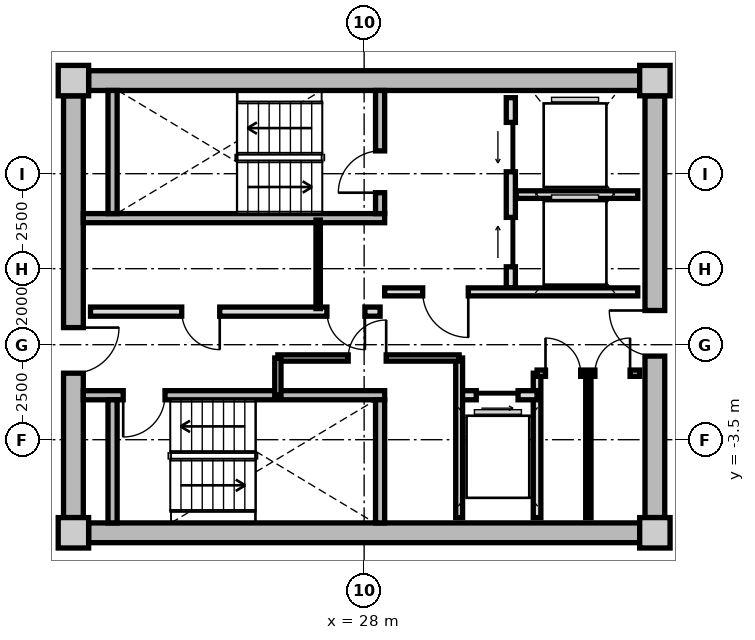
"""IFC4 building model, lengths in metres.
Left out: names, types, materials, properties, quantities, classifications, styles, units other than length and angle.
Written with IfcOpenShell. Run it as: python <this file> out.ifc"""

import sys

from ifc_helpers import new_model, si_unit, direction, frame, frame_2d, origin, origin_2d, place, context, subcontext, project, spatial, rectangle, extrude, source, transform, mapped, element, fill, save


model = new_model("IFC4")
c1 = context("Model", 3, precision=1e-05, world=origin(), true_north=direction((0.0, 1.0)))
c2 = subcontext(c1, "Body", "Model", "MODEL_VIEW")
j1 = project(units=[si_unit("LENGTHUNIT", "METRE"), si_unit("PLANEANGLEUNIT", "RADIAN")], contexts=[c1])
p1 = place(None, origin())
s1 = spatial("IfcSite", under=j1, at=p1, CompositionType="ELEMENT")
p2 = place(p1, origin())
s2 = spatial("IfcBuilding", under=s1, at=p2, CompositionType="ELEMENT")
p3 = place(p2, frame((0.0, 0.0, 220.0)))
s3 = spatial("IfcBuildingStorey", under=s2, at=p3, CompositionType="ELEMENT", Elevation=220.0)
m1 = source(origin(), c2, "Body", "SweptSolid", [
    extrude(rectangle(XDim=0.8, YDim=0.8, at=origin_2d()), origin(), (0.0, 0.0, 1.0), 3.05),
])
for number, where, z_axis, x_axis in (
    (1, (20.35, -5.95, 0.0), (0.0, 0.0, 1.0), (1.0, 0.0, 0.0)),
    (2, (35.65, -5.95, 0.0), (0.0, 0.0, 1.0), (1.0, 0.0, 0.0)),
    (3, (35.65, 5.95, 0.0), (0.0, 0.0, 1.0), (1.0, 0.0, 0.0)),
    (4, (20.35, 5.95, 0.0), (0.0, 0.0, 1.0), (1.0, 0.0, 0.0)),
):
    element("IfcColumn", number, at=place(p3, frame(where, z_axis=z_axis, x_axis=x_axis)), inside=s3, PredefinedType="COLUMN", context=c2, shape_type="MappedRepresentation", body=[
        mapped(m1, transform((0.0, 0.0, 0.0), x_axis=(1.0, 0.0, 0.0), y_axis=(0.0, 1.0, 0.0), z_axis=(0.0, 0.0, 1.0), scale=1.0)),
    ])
m2 = source(origin(), c2, "Body", "SweptSolid", [
    extrude(rectangle(XDim=14.5, YDim=0.52, at=frame_2d((7.25, 0.0))), origin(), (0.0, 0.0, 1.0), 2.76),
])
for number, where, z_axis, x_axis in (
    (5, (20.75, 5.95, 0.0), (0.0, 0.0, 1.0), (1.0, 0.0, 0.0)),
    (6, (35.25, -5.95, 0.0), (0.0, 0.0, 1.0), (-1.0, 0.0, 0.0)),
):
    element("IfcWall", number, at=place(p3, frame(where, z_axis=z_axis, x_axis=x_axis)), inside=s3, PredefinedType="SHEAR", context=c2, shape_type="MappedRepresentation", body=[
        mapped(m2, transform((0.0, 0.0, 0.0), x_axis=(1.0, 0.0, 0.0), y_axis=(0.0, 1.0, 0.0), z_axis=(0.0, 0.0, 1.0), scale=1.0)),
    ])
m3 = source(origin(), c2, "Body", "SweptSolid", [
    extrude(rectangle(XDim=11.1, YDim=0.52, at=frame_2d((5.55, 0.0))), origin(), (0.0, 0.0, 1.0), 2.76),
])
p4 = place(p3, frame((20.35, -5.55, 0.0), z_axis=(0.0, 0.0, 1.0), x_axis=(0.0, 1.0, 0.0)))
e7 = element("IfcWall", 7, at=p4, inside=s3, PredefinedType="SHEAR", context=c2, shape_type="MappedRepresentation", body=[
    mapped(m3, transform((0.0, 0.0, 0.0), x_axis=(1.0, 0.0, 0.0), y_axis=(0.0, 1.0, 0.0), z_axis=(0.0, 0.0, 1.0), scale=1.0)),
])
p5 = place(p4, frame((3.8, 0.0, 0.0)))
e8 = element("IfcOpeningElement", 8, at=p5, cuts=e7, PredefinedType="OPENING", context=c2, shape_type="SweptSolid", body=[
    extrude(rectangle(XDim=1.2, YDim=2.15, at=frame_2d((0.6, 1.075))), frame((0.0, 0.27, 0.0), z_axis=(0.0, -1.0, 0.0), x_axis=(1.0, 0.0, 0.0)), (0.0, 0.0, 1.0), 0.54),
])
p6 = place(p3, frame((35.65, 5.55, 0.0), z_axis=(0.0, 0.0, 1.0), x_axis=(0.0, -1.0, 0.0)))
e9 = element("IfcWall", 9, at=p6, inside=s3, PredefinedType="SHEAR", context=c2, shape_type="MappedRepresentation", body=[
    mapped(m3, transform((0.0, 0.0, 0.0), x_axis=(1.0, 0.0, 0.0), y_axis=(0.0, 1.0, 0.0), z_axis=(0.0, 0.0, 1.0), scale=1.0)),
])
p7 = place(p6, frame((5.65, 0.0, 0.0)))
e10 = element("IfcOpeningElement", 10, at=p7, cuts=e9, PredefinedType="OPENING", context=c2, shape_type="SweptSolid", body=[
    extrude(rectangle(XDim=1.2, YDim=2.15, at=frame_2d((0.6, 1.075))), frame((0.0, 0.27, 0.0), z_axis=(0.0, -1.0, 0.0), x_axis=(1.0, 0.0, 0.0)), (0.0, 0.0, 1.0), 0.54),
])
m4 = source(origin(), c2, "Body", "SweptSolid", [
    extrude(rectangle(XDim=7.93, YDim=0.24, at=frame_2d((3.965, 0.0))), origin(), (0.0, 0.0, 1.0), 2.76),
])
p8 = place(p3, frame((20.61, 2.33, 0.0), z_axis=(0.0, 0.0, 1.0), x_axis=(1.0, 0.0, 0.0)))
e11 = element("IfcWall", 11, at=p8, inside=s3, PredefinedType="PARTITIONING", context=c2, shape_type="MappedRepresentation", body=[
    mapped(m4, transform((0.0, 0.0, 0.0), x_axis=(1.0, 0.0, 0.0), y_axis=(0.0, 1.0, 0.0), z_axis=(0.0, 0.0, 1.0), scale=1.0)),
])
m5 = source(origin(), c2, "Body", "SweptSolid", [
    extrude(rectangle(XDim=3.24, YDim=0.24, at=frame_2d((1.62, 0.0))), origin(), (0.0, 0.0, 1.0), 2.76),
])
p9 = place(p3, frame((21.38, 2.45, 0.0), z_axis=(0.0, 0.0, 1.0), x_axis=(0.0, 1.0, 0.0)))
e12 = element("IfcWall", 12, at=p9, inside=s3, PredefinedType="PARTITIONING", context=c2, shape_type="MappedRepresentation", body=[
    mapped(m5, transform((0.0, 0.0, 0.0), x_axis=(1.0, 0.0, 0.0), y_axis=(0.0, 1.0, 0.0), z_axis=(0.0, 0.0, 1.0), scale=1.0)),
])
p10 = place(p3, frame((28.42, 2.45, 0.0), z_axis=(0.0, 0.0, 1.0), x_axis=(0.0, 1.0, 0.0)))
e13 = element("IfcWall", 13, at=p10, inside=s3, PredefinedType="PARTITIONING", context=c2, shape_type="MappedRepresentation", body=[
    mapped(m5, transform((0.0, 0.0, 0.0), x_axis=(1.0, 0.0, 0.0), y_axis=(0.0, 1.0, 0.0), z_axis=(0.0, 0.0, 1.0), scale=1.0)),
])
p11 = place(p10, frame((0.55, 0.0, 0.0)))
e14 = element("IfcOpeningElement", 14, at=p11, cuts=e13, PredefinedType="OPENING", context=c2, shape_type="SweptSolid", body=[
    extrude(rectangle(XDim=1.1, YDim=2.15, at=frame_2d((0.55, 1.075))), frame((0.0, 0.13, 0.0), z_axis=(0.0, -1.0, 0.0), x_axis=(1.0, 0.0, 0.0)), (0.0, 0.0, 1.0), 0.26),
])
p12 = place(p3, frame((20.61, -2.33, 0.0), z_axis=(0.0, 0.0, 1.0), x_axis=(1.0, 0.0, 0.0)))
e15 = element("IfcWall", 15, at=p12, inside=s3, PredefinedType="PARTITIONING", context=c2, shape_type="MappedRepresentation", body=[
    mapped(m4, transform((0.0, 0.0, 0.0), x_axis=(1.0, 0.0, 0.0), y_axis=(0.0, 1.0, 0.0), z_axis=(0.0, 0.0, 1.0), scale=1.0)),
])
p13 = place(p12, frame((1.05, 0.0, 0.0)))
e16 = element("IfcOpeningElement", 16, at=p13, cuts=e15, PredefinedType="OPENING", context=c2, shape_type="SweptSolid", body=[
    extrude(rectangle(XDim=1.1, YDim=2.15, at=frame_2d((0.55, 1.075))), frame((0.0, 0.13, 0.0), z_axis=(0.0, -1.0, 0.0), x_axis=(1.0, 0.0, 0.0)), (0.0, 0.0, 1.0), 0.26),
])
for number, where, z_axis, x_axis in (
    (17, (21.38, -5.69, 0.0), (0.0, 0.0, 1.0), (0.0, 1.0, 0.0)),
    (18, (28.42, -5.69, 0.0), (0.0, 0.0, 1.0), (0.0, 1.0, 0.0)),
):
    element("IfcWall", number, at=place(p3, frame(where, z_axis=z_axis, x_axis=x_axis)), inside=s3, PredefinedType="PARTITIONING", context=c2, shape_type="MappedRepresentation", body=[
        mapped(m5, transform((0.0, 0.0, 0.0), x_axis=(1.0, 0.0, 0.0), y_axis=(0.0, 1.0, 0.0), z_axis=(0.0, 0.0, 1.0), scale=1.0)),
    ])
m6 = source(origin(), c2, "Body", "SweptSolid", [
    extrude(rectangle(XDim=5.0, YDim=0.24, at=frame_2d((2.5, 0.0))), origin(), (0.0, 0.0, 1.0), 2.745),
])
p14 = place(p3, frame((31.86, 0.5, 0.0), z_axis=(0.0, 0.0, 1.0), x_axis=(0.0, 1.0, 0.0)))
e19 = element("IfcWall", 19, at=p14, inside=s3, PredefinedType="PARTITIONING", context=c2, shape_type="MappedRepresentation", body=[
    mapped(m6, transform((0.0, 0.0, 0.0), x_axis=(1.0, 0.0, 0.0), y_axis=(0.0, 1.0, 0.0), z_axis=(0.0, 0.0, 1.0), scale=1.0)),
])
p15 = place(p14, frame((3.05, 0.0, 0.0)))
e20 = element("IfcOpeningElement", 20, at=p15, cuts=e19, PredefinedType="OPENING", context=c2, shape_type="SweptSolid", body=[
    extrude(rectangle(XDim=1.3, YDim=2.2, at=frame_2d((0.65, 1.1))), frame((0.0, 0.13, 0.0), z_axis=(0.0, -1.0, 0.0), x_axis=(1.0, 0.0, 0.0)), (0.0, 0.0, 1.0), 0.26),
])
p16 = place(p14, frame((0.55, 0.0, 0.0)))
e21 = element("IfcOpeningElement", 21, at=p16, cuts=e19, PredefinedType="OPENING", context=c2, shape_type="SweptSolid", body=[
    extrude(rectangle(XDim=1.3, YDim=2.2, at=frame_2d((0.65, 1.1))), frame((0.0, 0.13, 0.0), z_axis=(0.0, -1.0, 0.0), x_axis=(1.0, 0.0, 0.0)), (0.0, 0.0, 1.0), 0.26),
])
m7 = source(origin(), c2, "Body", "SweptSolid", [
    extrude(rectangle(XDim=3.2, YDim=0.2, at=frame_2d((1.6, 0.0))), origin(), (0.0, 0.0, 1.0), 2.745),
])
p17 = place(p3, frame((32.0, 2.95, 0.0), z_axis=(0.0, 0.0, 1.0), x_axis=(1.0, 0.0, 0.0)))
e22 = element("IfcWall", 22, at=p17, inside=s3, PredefinedType="PARTITIONING", context=c2, shape_type="MappedRepresentation", body=[
    mapped(m7, transform((0.0, 0.0, 0.0), x_axis=(1.0, 0.0, 0.0), y_axis=(0.0, 1.0, 0.0), z_axis=(0.0, 0.0, 1.0), scale=1.0)),
])
m8 = source(origin(), c2, "Body", "SweptSolid", [
    extrude(rectangle(XDim=6.66, YDim=0.21, at=frame_2d((3.33, 0.0))), origin(), (0.0, 0.0, 1.0), 2.745),
])
p18 = place(p3, frame((28.54, 0.39, 0.0), z_axis=(0.0, 0.0, 1.0), x_axis=(1.0, 0.0, 0.0)))
e23 = element("IfcWall", 23, at=p18, inside=s3, PredefinedType="PARTITIONING", context=c2, shape_type="MappedRepresentation", body=[
    mapped(m8, transform((0.0, 0.0, 0.0), x_axis=(1.0, 0.0, 0.0), y_axis=(0.0, 1.0, 0.0), z_axis=(0.0, 0.0, 1.0), scale=1.0)),
])
p19 = place(p18, frame((1.0, 0.0, 0.0)))
e24 = element("IfcOpeningElement", 24, at=p19, cuts=e23, PredefinedType="OPENING", context=c2, shape_type="SweptSolid", body=[
    extrude(rectangle(XDim=1.2, YDim=2.15, at=frame_2d((0.6, 1.075))), frame((0.0, 0.115, 0.0), z_axis=(0.0, -1.0, 0.0), x_axis=(1.0, 0.0, 0.0)), (0.0, 0.0, 1.0), 0.23),
])
m9 = source(origin(), c2, "Body", "SweptSolid", [
    extrude(rectangle(XDim=7.62, YDim=0.24, at=frame_2d((3.81, 0.0))), origin(), (0.0, 0.0, 1.0), 2.745),
])
p20 = place(p3, frame((20.8, -0.13, 0.0), z_axis=(0.0, 0.0, 1.0), x_axis=(1.0, 0.0, 0.0)))
e25 = element("IfcWall", 25, at=p20, inside=s3, PredefinedType="PARTITIONING", context=c2, shape_type="MappedRepresentation", body=[
    mapped(m9, transform((0.0, 0.0, 0.0), x_axis=(1.0, 0.0, 0.0), y_axis=(0.0, 1.0, 0.0), z_axis=(0.0, 0.0, 1.0), scale=1.0)),
])
p21 = place(p20, frame((6.22, 0.0, 0.0)))
e26 = element("IfcOpeningElement", 26, at=p21, cuts=e25, PredefinedType="OPENING", context=c2, shape_type="SweptSolid", body=[
    extrude(rectangle(XDim=1.0, YDim=2.1, at=frame_2d((0.5, 1.05))), frame((0.0, 0.13, 0.0), z_axis=(0.0, -1.0, 0.0), x_axis=(1.0, 0.0, 0.0)), (0.0, 0.0, 1.0), 0.26),
])
p22 = place(p20, frame((2.4, 0.0, 0.0)))
e27 = element("IfcOpeningElement", 27, at=p22, cuts=e25, PredefinedType="OPENING", context=c2, shape_type="SweptSolid", body=[
    extrude(rectangle(XDim=1.0, YDim=2.1, at=frame_2d((0.5, 1.05))), frame((0.0, 0.13, 0.0), z_axis=(0.0, -1.0, 0.0), x_axis=(1.0, 0.0, 0.0)), (0.0, 0.0, 1.0), 0.26),
])
m10 = source(origin(), c2, "Body", "SweptSolid", [
    extrude(rectangle(XDim=2.33, YDim=0.115, at=frame_2d((1.165, 0.0))), origin(), (0.0, 0.0, 1.0), 2.745),
])
p23 = place(p3, frame((26.79, -0.05, 0.0), z_axis=(0.0, 0.0, 1.0), x_axis=(0.0, 1.0, 0.0)))
e28 = element("IfcWall", 28, at=p23, inside=s3, PredefinedType="PARTITIONING", context=c2, shape_type="MappedRepresentation", body=[
    mapped(m10, transform((0.0, 0.0, 0.0), x_axis=(1.0, 0.0, 0.0), y_axis=(0.0, 1.0, 0.0), z_axis=(0.0, 0.0, 1.0), scale=1.0)),
])
m11 = source(origin(), c2, "Body", "SweptSolid", [
    extrude(rectangle(XDim=3.8, YDim=0.2, at=frame_2d((1.9, 0.0))), origin(), (0.0, 0.0, 1.0), 2.745),
])
p24 = place(p3, frame((32.55, -5.55, 0.0), z_axis=(0.0, 0.0, 1.0), x_axis=(0.0, 1.0, 0.0)))
e29 = element("IfcWall", 29, at=p24, inside=s3, PredefinedType="PARTITIONING", context=c2, shape_type="MappedRepresentation", body=[
    mapped(m11, transform((0.0, 0.0, 0.0), x_axis=(1.0, 0.0, 0.0), y_axis=(0.0, 1.0, 0.0), z_axis=(0.0, 0.0, 1.0), scale=1.0)),
])
m12 = source(origin(), c2, "Body", "SweptSolid", [
    extrude(rectangle(XDim=2.05, YDim=0.24, at=frame_2d((1.025, 0.0))), origin(), (0.0, 0.0, 1.0), 2.745),
])
p25 = place(p3, frame((30.5, -2.33, 0.0), z_axis=(0.0, 0.0, 1.0), x_axis=(1.0, 0.0, 0.0)))
e30 = element("IfcWall", 30, at=p25, inside=s3, PredefinedType="PARTITIONING", context=c2, shape_type="MappedRepresentation", body=[
    mapped(m12, transform((0.0, 0.0, 0.0), x_axis=(1.0, 0.0, 0.0), y_axis=(0.0, 1.0, 0.0), z_axis=(0.0, 0.0, 1.0), scale=1.0)),
])
p26 = place(p25, frame((0.45, 0.0, 0.0)))
e31 = element("IfcOpeningElement", 31, at=p26, cuts=e30, PredefinedType="OPENING", context=c2, shape_type="SweptSolid", body=[
    extrude(rectangle(XDim=1.1, YDim=2.2, at=frame_2d((0.55, 1.1))), frame((0.0, 0.13, 0.0), z_axis=(0.0, -1.0, 0.0), x_axis=(1.0, 0.0, 0.0)), (0.0, 0.0, 1.0), 0.26),
])
m13 = source(origin(), c2, "Body", "SweptSolid", [
    extrude(rectangle(XDim=4.2, YDim=0.18, at=frame_2d((2.1, 0.0))), origin(), (0.0, 0.0, 1.0), 2.745),
])
p27 = place(p3, frame((30.5, -5.55, 0.0), z_axis=(0.0, 0.0, 1.0), x_axis=(0.0, 1.0, 0.0)))
e32 = element("IfcWall", 32, at=p27, inside=s3, PredefinedType="PARTITIONING", context=c2, shape_type="MappedRepresentation", body=[
    mapped(m13, transform((0.0, 0.0, 0.0), x_axis=(1.0, 0.0, 0.0), y_axis=(0.0, 1.0, 0.0), z_axis=(0.0, 0.0, 1.0), scale=1.0)),
])
m14 = source(origin(), c2, "Body", "SweptSolid", [
    extrude(rectangle(XDim=4.77, YDim=0.165, at=frame_2d((2.385, 0.0))), origin(), (0.0, 0.0, 1.0), 2.745),
])
p28 = place(p3, frame((25.73, -1.35, 0.0), z_axis=(0.0, 0.0, 1.0), x_axis=(1.0, 0.0, 0.0)))
e33 = element("IfcWall", 33, at=p28, inside=s3, PredefinedType="PARTITIONING", context=c2, shape_type="MappedRepresentation", body=[
    mapped(m14, transform((0.0, 0.0, 0.0), x_axis=(1.0, 0.0, 0.0), y_axis=(0.0, 1.0, 0.0), z_axis=(0.0, 0.0, 1.0), scale=1.0)),
])
p29 = place(p28, frame((1.85, 0.0, 0.0)))
e34 = element("IfcOpeningElement", 34, at=p29, cuts=e33, PredefinedType="OPENING", context=c2, shape_type="SweptSolid", body=[
    extrude(rectangle(XDim=1.0, YDim=2.1, at=frame_2d((0.5, 1.05))), frame((0.0, 0.093, 0.0), z_axis=(0.0, -1.0, 0.0), x_axis=(1.0, 0.0, 0.0)), (0.0, 0.0, 1.0), 0.185),
])
m15 = source(origin(), c2, "Body", "SweptSolid", [
    extrude(rectangle(XDim=0.98, YDim=0.165, at=frame_2d((0.49, 0.0))), origin(), (0.0, 0.0, 1.0), 2.745),
])
p30 = place(p3, frame((25.73, -2.33, 0.0), z_axis=(0.0, 0.0, 1.0), x_axis=(0.0, 1.0, 0.0)))
e35 = element("IfcWall", 35, at=p30, inside=s3, PredefinedType="PARTITIONING", context=c2, shape_type="MappedRepresentation", body=[
    mapped(m15, transform((0.0, 0.0, 0.0), x_axis=(1.0, 0.0, 0.0), y_axis=(0.0, 1.0, 0.0), z_axis=(0.0, 0.0, 1.0), scale=1.0)),
])
m16 = source(origin(), c2, "Body", "SweptSolid", [
    extrude(rectangle(XDim=2.7, YDim=0.165, at=frame_2d((1.35, 0.0))), origin(), (0.0, 0.0, 1.0), 2.745),
])
p31 = place(p3, frame((32.55, -1.75, 0.0), z_axis=(0.0, 0.0, 1.0), x_axis=(1.0, 0.0, 0.0)))
e36 = element("IfcWall", 36, at=p31, inside=s3, PredefinedType="PARTITIONING", context=c2, shape_type="MappedRepresentation", body=[
    mapped(m16, transform((0.0, 0.0, 0.0), x_axis=(1.0, 0.0, 0.0), y_axis=(0.0, 1.0, 0.0), z_axis=(0.0, 0.0, 1.0), scale=1.0)),
])
p32 = place(p31, frame((0.222, 0.0, 0.0)))
e37 = element("IfcOpeningElement", 37, at=p32, cuts=e36, PredefinedType="OPENING", context=c2, shape_type="SweptSolid", body=[
    extrude(rectangle(XDim=0.925, YDim=2.1, at=frame_2d((0.462, 1.05))), frame((0.0, 0.093, 0.0), z_axis=(0.0, -1.0, 0.0), x_axis=(1.0, 0.0, 0.0)), (0.0, 0.0, 1.0), 0.185),
])
p33 = place(p31, frame((1.522, 0.0, 0.0)))
e38 = element("IfcOpeningElement", 38, at=p33, cuts=e36, PredefinedType="OPENING", context=c2, shape_type="SweptSolid", body=[
    extrude(rectangle(XDim=0.925, YDim=2.1, at=frame_2d((0.462, 1.05))), frame((0.0, 0.093, 0.0), z_axis=(0.0, -1.0, 0.0), x_axis=(1.0, 0.0, 0.0)), (0.0, 0.0, 1.0), 0.185),
])
m17 = source(origin(), c2, "Body", "SweptSolid", [
    extrude(rectangle(XDim=3.8, YDim=0.14, at=frame_2d((1.9, 0.0))), origin(), (0.0, 0.0, 1.0), 2.745),
])
p34 = place(p3, frame((33.9, -5.55, 0.0), z_axis=(0.0, 0.0, 1.0), x_axis=(0.0, 1.0, 0.0)))
e39 = element("IfcWall", 39, at=p34, inside=s3, PredefinedType="PARTITIONING", context=c2, shape_type="MappedRepresentation", body=[
    mapped(m17, transform((0.0, 0.0, 0.0), x_axis=(1.0, 0.0, 0.0), y_axis=(0.0, 1.0, 0.0), z_axis=(0.0, 0.0, 1.0), scale=1.0)),
])
m18 = source(origin(), c2, "Body", "SweptSolid", [
    extrude(rectangle(XDim=1.1, YDim=2.15, at=frame_2d((0.55, 1.075))), frame((0.0, 0.025, 0.0), z_axis=(0.0, -1.0, 0.0), x_axis=(1.0, 0.0, 0.0)), (0.0, 0.0, 1.0), 0.05),
])
p35 = place(p11, origin())
e40 = element("IfcDoor", 40, at=p35, inside=s3, OperationType="SINGLE_SWING_LEFT", PredefinedType="DOOR", context=c2, shape_type="MappedRepresentation", body=[
    mapped(m18, transform((0.0, 0.0, 0.0), x_axis=(1.0, 0.0, 0.0), y_axis=(0.0, 1.0, 0.0), z_axis=(0.0, 0.0, 1.0), scale=1.0)),
])
fill(e14, e40)
p36 = place(p13, frame((1.1, 0.0, 0.0), z_axis=(0.0, 0.0, 1.0), x_axis=(-1.0, 0.0, 0.0)))
e41 = element("IfcDoor", 41, at=p36, inside=s3, OperationType="SINGLE_SWING_RIGHT", PredefinedType="DOOR", context=c2, shape_type="MappedRepresentation", body=[
    mapped(m18, transform((0.0, 0.0, 0.0), x_axis=(1.0, 0.0, 0.0), y_axis=(0.0, 1.0, 0.0), z_axis=(0.0, 0.0, 1.0), scale=1.0)),
])
fill(e16, e41)
m19 = source(origin(), c2, "Body", "SweptSolid", [
    extrude(rectangle(XDim=1.3, YDim=2.2, at=frame_2d((0.65, 1.1))), frame((0.0, 0.025, 0.0), z_axis=(0.0, -1.0, 0.0), x_axis=(1.0, 0.0, 0.0)), (0.0, 0.0, 1.0), 0.05),
])
p37 = place(p15, origin())
e42 = element("IfcDoor", 42, at=p37, inside=s3, OperationType="SLIDING_TO_LEFT", PredefinedType="DOOR", context=c2, shape_type="MappedRepresentation", body=[
    mapped(m19, transform((0.0, 0.0, 0.0), x_axis=(1.0, 0.0, 0.0), y_axis=(0.0, 1.0, 0.0), z_axis=(0.0, 0.0, 1.0), scale=1.0)),
])
fill(e20, e42)
p38 = place(p16, origin())
e43 = element("IfcDoor", 43, at=p38, inside=s3, OperationType="SLIDING_TO_RIGHT", PredefinedType="DOOR", context=c2, shape_type="MappedRepresentation", body=[
    mapped(m19, transform((0.0, 0.0, 0.0), x_axis=(1.0, 0.0, 0.0), y_axis=(0.0, 1.0, 0.0), z_axis=(0.0, 0.0, 1.0), scale=1.0)),
])
fill(e21, e43)
m20 = source(origin(), c2, "Body", "SweptSolid", [
    extrude(rectangle(XDim=1.2, YDim=2.15, at=frame_2d((0.6, 1.075))), frame((0.0, 0.025, 0.0), z_axis=(0.0, -1.0, 0.0), x_axis=(1.0, 0.0, 0.0)), (0.0, 0.0, 1.0), 0.05),
])
p39 = place(p19, frame((1.2, 0.0, 0.0), z_axis=(0.0, 0.0, 1.0), x_axis=(-1.0, 0.0, 0.0)))
e44 = element("IfcDoor", 44, at=p39, inside=s3, OperationType="SINGLE_SWING_LEFT", PredefinedType="DOOR", context=c2, shape_type="MappedRepresentation", body=[
    mapped(m20, transform((0.0, 0.0, 0.0), x_axis=(1.0, 0.0, 0.0), y_axis=(0.0, 1.0, 0.0), z_axis=(0.0, 0.0, 1.0), scale=1.0)),
])
fill(e24, e44)
p40 = place(p5, frame((1.2, 0.0, 0.0), z_axis=(0.0, 0.0, 1.0), x_axis=(-1.0, 0.0, 0.0)))
e45 = element("IfcDoor", 45, at=p40, inside=s3, OperationType="SINGLE_SWING_LEFT", PredefinedType="DOOR", context=c2, shape_type="MappedRepresentation", body=[
    mapped(m20, transform((0.0, 0.0, 0.0), x_axis=(1.0, 0.0, 0.0), y_axis=(0.0, 1.0, 0.0), z_axis=(0.0, 0.0, 1.0), scale=1.0)),
])
fill(e8, e45)
p41 = place(p7, frame((1.2, 0.0, 0.0), z_axis=(0.0, 0.0, 1.0), x_axis=(-1.0, 0.0, 0.0)))
e46 = element("IfcDoor", 46, at=p41, inside=s3, OperationType="SINGLE_SWING_RIGHT", PredefinedType="DOOR", context=c2, shape_type="MappedRepresentation", body=[
    mapped(m20, transform((0.0, 0.0, 0.0), x_axis=(1.0, 0.0, 0.0), y_axis=(0.0, 1.0, 0.0), z_axis=(0.0, 0.0, 1.0), scale=1.0)),
])
fill(e10, e46)
m21 = source(origin(), c2, "Body", "SweptSolid", [
    extrude(rectangle(XDim=1.0, YDim=2.1, at=frame_2d((0.5, 1.05))), frame((0.0, 0.025, 0.0), z_axis=(0.0, -1.0, 0.0), x_axis=(1.0, 0.0, 0.0)), (0.0, 0.0, 1.0), 0.05),
])
p42 = place(p21, frame((1.0, 0.0, 0.0), z_axis=(0.0, 0.0, 1.0), x_axis=(-1.0, 0.0, 0.0)))
e47 = element("IfcDoor", 47, at=p42, inside=s3, OperationType="SINGLE_SWING_LEFT", PredefinedType="DOOR", context=c2, shape_type="MappedRepresentation", body=[
    mapped(m21, transform((0.0, 0.0, 0.0), x_axis=(1.0, 0.0, 0.0), y_axis=(0.0, 1.0, 0.0), z_axis=(0.0, 0.0, 1.0), scale=1.0)),
])
fill(e26, e47)
p43 = place(p22, frame((1.0, 0.0, 0.0), z_axis=(0.0, 0.0, 1.0), x_axis=(-1.0, 0.0, 0.0)))
e48 = element("IfcDoor", 48, at=p43, inside=s3, OperationType="SINGLE_SWING_LEFT", PredefinedType="DOOR", context=c2, shape_type="MappedRepresentation", body=[
    mapped(m21, transform((0.0, 0.0, 0.0), x_axis=(1.0, 0.0, 0.0), y_axis=(0.0, 1.0, 0.0), z_axis=(0.0, 0.0, 1.0), scale=1.0)),
])
fill(e27, e48)
m22 = source(origin(), c2, "Body", "SweptSolid", [
    extrude(rectangle(XDim=1.1, YDim=2.2, at=frame_2d((0.55, 1.1))), frame((0.0, 0.025, 0.0), z_axis=(0.0, -1.0, 0.0), x_axis=(1.0, 0.0, 0.0)), (0.0, 0.0, 1.0), 0.05),
])
p44 = place(p26, frame((1.1, 0.0, 0.0), z_axis=(0.0, 0.0, 1.0), x_axis=(-1.0, 0.0, 0.0)))
e49 = element("IfcDoor", 49, at=p44, inside=s3, OperationType="SLIDING_TO_RIGHT", PredefinedType="DOOR", context=c2, shape_type="MappedRepresentation", body=[
    mapped(m22, transform((0.0, 0.0, 0.0), x_axis=(1.0, 0.0, 0.0), y_axis=(0.0, 1.0, 0.0), z_axis=(0.0, 0.0, 1.0), scale=1.0)),
])
fill(e31, e49)
p45 = place(p29, origin())
e50 = element("IfcDoor", 50, at=p45, inside=s3, OperationType="SINGLE_SWING_RIGHT", PredefinedType="DOOR", context=c2, shape_type="MappedRepresentation", body=[
    mapped(m21, transform((0.0, 0.0, 0.0), x_axis=(1.0, 0.0, 0.0), y_axis=(0.0, 1.0, 0.0), z_axis=(0.0, 0.0, 1.0), scale=1.0)),
])
fill(e34, e50)
m23 = source(origin(), c2, "Body", "SweptSolid", [
    extrude(rectangle(XDim=0.925, YDim=2.1, at=frame_2d((0.462, 1.05))), frame((0.0, 0.025, 0.0), z_axis=(0.0, -1.0, 0.0), x_axis=(1.0, 0.0, 0.0)), (0.0, 0.0, 1.0), 0.05),
])
p46 = place(p32, origin())
e51 = element("IfcDoor", 51, at=p46, inside=s3, OperationType="SINGLE_SWING_LEFT", PredefinedType="DOOR", context=c2, shape_type="MappedRepresentation", body=[
    mapped(m23, transform((0.0, 0.0, 0.0), x_axis=(1.0, 0.0, 0.0), y_axis=(0.0, 1.0, 0.0), z_axis=(0.0, 0.0, 1.0), scale=1.0)),
])
fill(e37, e51)
p47 = place(p33, origin())
e52 = element("IfcDoor", 52, at=p47, inside=s3, OperationType="SINGLE_SWING_RIGHT", PredefinedType="DOOR", context=c2, shape_type="MappedRepresentation", body=[
    mapped(m23, transform((0.0, 0.0, 0.0), x_axis=(1.0, 0.0, 0.0), y_axis=(0.0, 1.0, 0.0), z_axis=(0.0, 0.0, 1.0), scale=1.0)),
])
fill(e38, e52)
save(model, sys.argv[1])
